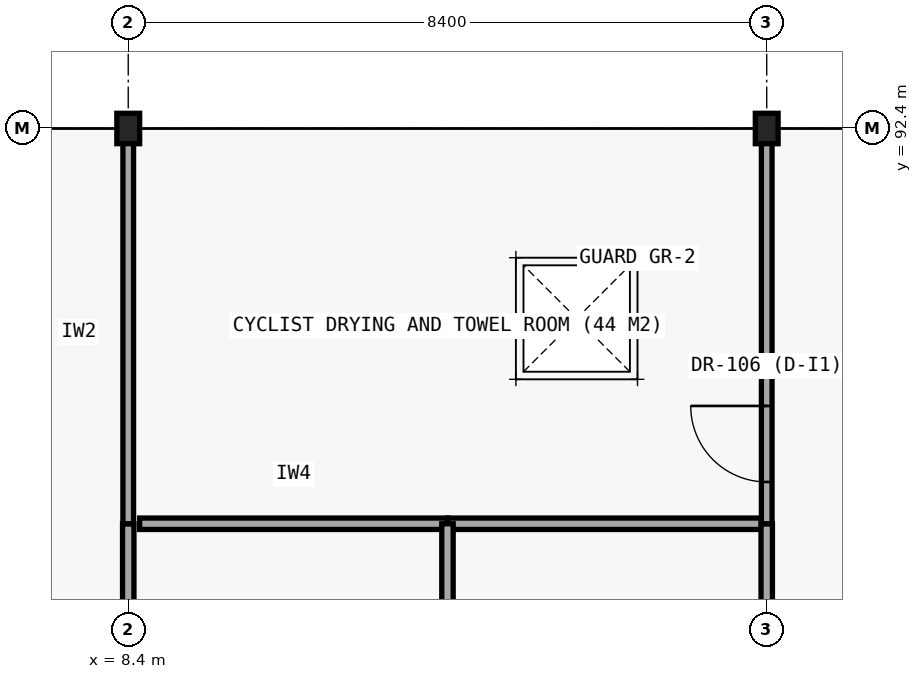
"""IFC4 building model, lengths in metres.
Left out: names, types, materials, properties, quantities, classifications, styles, units other than length and angle.
Written with IfcOpenShell. Run it as: python <this file> out.ifc"""

import sys

from ifc_helpers import new_model, si_unit, direction, frame, frame_2d, origin, origin_2d, place, context, subcontext, project, spatial, rectangle, i_section, extrude, element, fill, save


model = new_model("IFC4")
c1 = context("Model", 3, precision=1e-05, world=origin(), true_north=direction((0.0, 1.0)))
c2 = subcontext(c1, "Body", "Model", "MODEL_VIEW")
j1 = project(units=[si_unit("LENGTHUNIT", "METRE"), si_unit("PLANEANGLEUNIT", "RADIAN")], contexts=[c1])
p1 = place(None, origin())
s1 = spatial("IfcSite", under=j1, at=p1, CompositionType="ELEMENT")
p2 = place(p1, origin())
s2 = spatial("IfcBuilding", under=s1, at=p2, CompositionType="ELEMENT")
p3 = place(p2, origin())
s3 = spatial("IfcBuildingStorey", under=s2, at=p3, CompositionType="ELEMENT", Elevation=0.0)
for number, where, z_axis, x_axis in (
    (1, (8.4, 92.4, 0.0), (0.0, 0.0, 1.0), (1.0, 0.0, 0.0)),
    (2, (16.8, 92.4, 0.0), (0.0, 0.0, 1.0), (1.0, 0.0, 0.0)),
):
    element("IfcColumn", number, at=place(p3, frame(where, z_axis=z_axis, x_axis=x_axis)), inside=s3, PredefinedType="COLUMN", context=c2, shape_type="SweptSolid", body=[
        extrude(i_section(OverallWidth=0.3, OverallDepth=0.4, WebThickness=0.013, FlangeThickness=0.024, FilletRadius=0.027, at=origin_2d()), origin(), (0.0, 0.0, 1.0), 4.8),
    ])
p4 = place(p3, frame((8.55, 87.2, 0.0), z_axis=(0.0, 0.0, 1.0), x_axis=(1.0, 0.0, 0.0)))
e3 = element("IfcWall", 3, at=p4, inside=s3, PredefinedType="PARTITIONING", context=c2, shape_type="SweptSolid", body=[
    extrude(rectangle(XDim=4.05, YDim=0.15, at=frame_2d((2.025, 0.0))), origin(), (0.0, 0.0, 1.0), 4.1),
])
p5 = place(p3, frame((12.6, 87.2, 0.0), z_axis=(0.0, 0.0, 1.0), x_axis=(1.0, 0.0, 0.0)))
e4 = element("IfcWall", 4, at=p5, inside=s3, PredefinedType="PARTITIONING", context=c2, shape_type="SweptSolid", body=[
    extrude(rectangle(XDim=4.2, YDim=0.15, at=frame_2d((2.1, 0.0))), origin(), (0.0, 0.0, 1.0), 4.1),
])
p6 = place(p3, frame((8.4, 82.0, 0.0), z_axis=(0.0, 0.0, 1.0), x_axis=(0.0, 1.0, 0.0)))
e5 = element("IfcWall", 5, at=p6, inside=s3, PredefinedType="PARTITIONING", context=c2, shape_type="SweptSolid", body=[
    extrude(rectangle(XDim=5.2, YDim=0.15, at=frame_2d((2.6, 0.0))), origin(), (0.0, 0.0, 1.0), 4.1),
])
p7 = place(p6, frame((0.55, 0.0, 0.0)))
e6 = element("IfcOpeningElement", 6, at=p7, cuts=e5, PredefinedType="OPENING", context=c2, shape_type="SweptSolid", body=[
    extrude(rectangle(XDim=0.95, YDim=2.1, at=frame_2d((0.475, 1.05))), frame((0.0, 0.085, 0.0), z_axis=(0.0, -1.0, 0.0), x_axis=(1.0, 0.0, 0.0)), (0.0, 0.0, 1.0), 0.17),
])
p8 = place(p3, frame((8.4, 87.2, 0.0), z_axis=(0.0, 0.0, 1.0), x_axis=(0.0, 1.0, 0.0)))
e7 = element("IfcWall", 7, at=p8, inside=s3, PredefinedType="PARTITIONING", context=c2, shape_type="SweptSolid", body=[
    extrude(rectangle(XDim=5.05, YDim=0.14, at=frame_2d((2.525, 0.0))), origin(), (0.0, 0.0, 1.0), 4.1),
])
for number, where, z_axis, x_axis in (
    (8, (12.6, 82.0, 0.0), (0.0, 0.0, 1.0), (0.0, 1.0, 0.0)),
    (9, (16.8, 82.0, 0.0), (0.0, 0.0, 1.0), (0.0, 1.0, 0.0)),
):
    element("IfcWall", number, at=place(p3, frame(where, z_axis=z_axis, x_axis=x_axis)), inside=s3, PredefinedType="PARTITIONING", context=c2, shape_type="SweptSolid", body=[
        extrude(rectangle(XDim=5.2, YDim=0.15, at=frame_2d((2.6, 0.0))), origin(), (0.0, 0.0, 1.0), 4.1),
    ])
p9 = place(p3, frame((16.8, 87.2, 0.0), z_axis=(0.0, 0.0, 1.0), x_axis=(0.0, 1.0, 0.0)))
e10 = element("IfcWall", 10, at=p9, inside=s3, PredefinedType="PARTITIONING", context=c2, shape_type="SweptSolid", body=[
    extrude(rectangle(XDim=5.05, YDim=0.14, at=frame_2d((2.525, 0.0))), origin(), (0.0, 0.0, 1.0), 4.1),
])
p10 = place(p9, frame((0.55, 0.0, 0.0)))
e11 = element("IfcOpeningElement", 11, at=p10, cuts=e10, PredefinedType="OPENING", context=c2, shape_type="SweptSolid", body=[
    extrude(rectangle(XDim=1.0, YDim=2.15, at=frame_2d((0.5, 1.075))), frame((0.0, 0.08, 0.0), z_axis=(0.0, -1.0, 0.0), x_axis=(1.0, 0.0, 0.0)), (0.0, 0.0, 1.0), 0.16),
])
p11 = place(p10, origin())
e12 = element("IfcDoor", 12, at=p11, inside=s3, OperationType="SINGLE_SWING_RIGHT", PredefinedType="DOOR", context=c2, shape_type="SweptSolid", body=[
    extrude(rectangle(XDim=1.0, YDim=2.15, at=frame_2d((0.5, 1.075))), frame((0.0, 0.025, 0.0), z_axis=(0.0, -1.0, 0.0), x_axis=(1.0, 0.0, 0.0)), (0.0, 0.0, 1.0), 0.05),
])
fill(e11, e12)
save(model, sys.argv[1])
